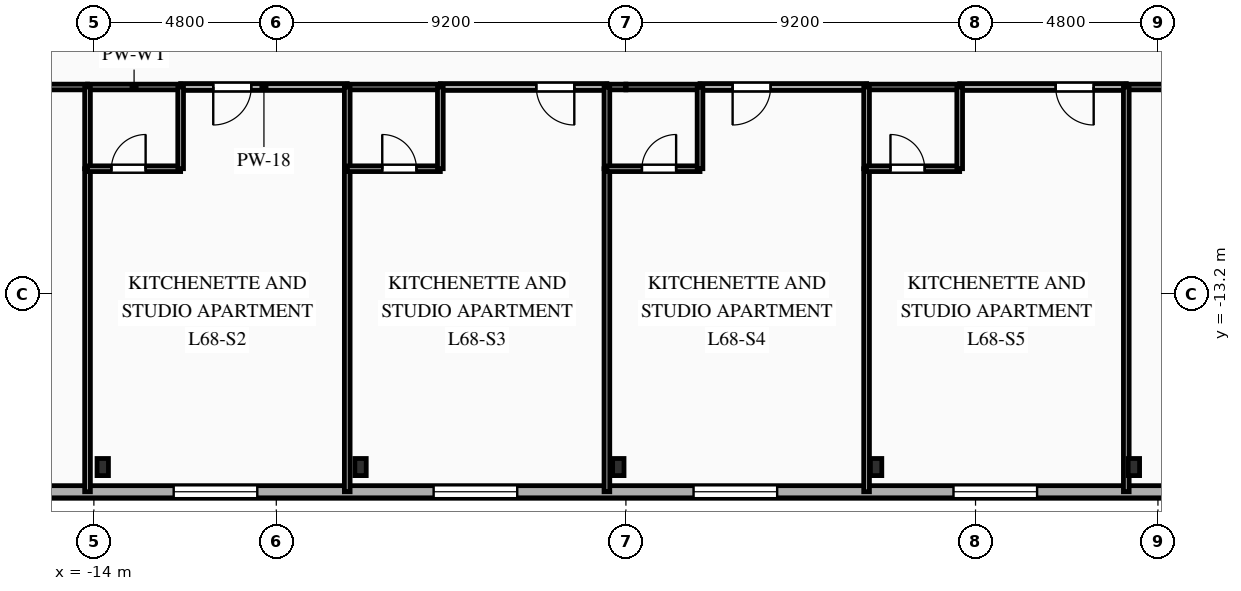
"""IFC4 building model, lengths in metres.
Left out: names, types, materials, properties, quantities, classifications, styles, units other than length and angle.
Written with IfcOpenShell. Run it as: python <this file> out.ifc"""

import sys

from ifc_helpers import new_model, si_unit, direction, frame, frame_2d, origin, origin_2d, place, context, subcontext, project, spatial, rectangle, i_section, extrude, element, fill, save


model = new_model("IFC4")
c1 = context("Model", 3, precision=1e-05, world=origin(), true_north=direction((0.0, 1.0)))
c2 = subcontext(c1, "Body", "Model", "MODEL_VIEW")
j1 = project(units=[si_unit("LENGTHUNIT", "METRE"), si_unit("PLANEANGLEUNIT", "RADIAN")], contexts=[c1])
p1 = place(None, origin())
s1 = spatial("IfcSite", under=j1, at=p1, CompositionType="ELEMENT")
p2 = place(p1, origin())
s2 = spatial("IfcBuilding", under=s1, at=p2, CompositionType="ELEMENT")
p3 = place(p2, frame((0.0, 0.0, 241.7)))
s3 = spatial("IfcBuildingStorey", under=s2, at=p3, CompositionType="ELEMENT", Elevation=241.7)
for number, where, z_axis, x_axis in (
    (1, (-13.767, -17.75, 0.0), (0.0, 0.0, 1.0), (1.0, 0.0, 0.0)),
    (2, (-6.983, -17.75, 0.0), (0.0, 0.0, 1.0), (1.0, 0.0, 0.0)),
    (3, (-0.2, -17.75, 0.0), (0.0, 0.0, 1.0), (1.0, 0.0, 0.0)),
    (4, (6.583, -17.75, 0.0), (0.0, 0.0, 1.0), (1.0, 0.0, 0.0)),
    (5, (13.367, -17.75, 0.0), (0.0, 0.0, 1.0), (1.0, 0.0, 0.0)),
):
    element("IfcColumn", number, at=place(p3, frame(where, z_axis=z_axis, x_axis=x_axis)), inside=s3, PredefinedType="COLUMN", context=c2, shape_type="SweptSolid", body=[
        extrude(i_section(OverallWidth=0.3, OverallDepth=0.45, WebThickness=0.014, FlangeThickness=0.026, FilletRadius=0.027, at=origin_2d()), origin(), (0.0, 0.0, 1.0), 3.35),
    ])
p4 = place(p3, frame((20.8, -18.4, 0.0), z_axis=(0.0, 0.0, 1.0), x_axis=(-1.0, 0.0, 0.0)))
e6 = element("IfcWall", 6, at=p4, inside=s3, PredefinedType="SOLIDWALL", context=c2, shape_type="SweptSolid", body=[
    extrude(rectangle(XDim=42.0, YDim=0.32, at=frame_2d((21.0, 0.0))), origin(), (0.0, 0.0, 1.0), 3.04),
])
p5 = place(p4, frame((3.255, 0.0, 0.85)))
e7 = element("IfcOpeningElement", 7, at=p5, cuts=e6, PredefinedType="OPENING", context=c2, shape_type="SweptSolid", body=[
    extrude(rectangle(XDim=1.65, YDim=1.85, at=frame_2d((0.825, 0.925))), frame((0.0, 0.17, 0.0), z_axis=(0.0, -1.0, 0.0), x_axis=(1.0, 0.0, 0.0)), (0.0, 0.0, 1.0), 0.34),
])
p6 = place(p4, frame((9.98, 0.0, 0.85)))
e8 = element("IfcOpeningElement", 8, at=p6, cuts=e6, PredefinedType="OPENING", context=c2, shape_type="SweptSolid", body=[
    extrude(rectangle(XDim=2.2, YDim=1.85, at=frame_2d((1.1, 0.925))), frame((0.0, 0.17, 0.0), z_axis=(0.0, -1.0, 0.0), x_axis=(1.0, 0.0, 0.0)), (0.0, 0.0, 1.0), 0.34),
])
p7 = place(p4, frame((16.82, 0.0, 0.85)))
e9 = element("IfcOpeningElement", 9, at=p7, cuts=e6, PredefinedType="OPENING", context=c2, shape_type="SweptSolid", body=[
    extrude(rectangle(XDim=2.2, YDim=1.85, at=frame_2d((1.1, 0.925))), frame((0.0, 0.17, 0.0), z_axis=(0.0, -1.0, 0.0), x_axis=(1.0, 0.0, 0.0)), (0.0, 0.0, 1.0), 0.34),
])
p8 = place(p4, frame((23.66, 0.0, 0.85)))
e10 = element("IfcOpeningElement", 10, at=p8, cuts=e6, PredefinedType="OPENING", context=c2, shape_type="SweptSolid", body=[
    extrude(rectangle(XDim=2.2, YDim=1.85, at=frame_2d((1.1, 0.925))), frame((0.0, 0.17, 0.0), z_axis=(0.0, -1.0, 0.0), x_axis=(1.0, 0.0, 0.0)), (0.0, 0.0, 1.0), 0.34),
])
p9 = place(p4, frame((30.5, 0.0, 0.85)))
e11 = element("IfcOpeningElement", 11, at=p9, cuts=e6, PredefinedType="OPENING", context=c2, shape_type="SweptSolid", body=[
    extrude(rectangle(XDim=2.2, YDim=1.85, at=frame_2d((1.1, 0.925))), frame((0.0, 0.17, 0.0), z_axis=(0.0, -1.0, 0.0), x_axis=(1.0, 0.0, 0.0)), (0.0, 0.0, 1.0), 0.34),
])
p10 = place(p4, frame((37.375, 0.0, 0.85)))
e12 = element("IfcOpeningElement", 12, at=p10, cuts=e6, PredefinedType="OPENING", context=c2, shape_type="SweptSolid", body=[
    extrude(rectangle(XDim=1.65, YDim=1.85, at=frame_2d((0.825, 0.925))), frame((0.0, 0.17, 0.0), z_axis=(0.0, -1.0, 0.0), x_axis=(1.0, 0.0, 0.0)), (0.0, 0.0, 1.0), 0.34),
])
p11 = place(p3, frame((-14.167, -7.75, 0.0), z_axis=(0.0, 0.0, 1.0), x_axis=(-1.0, 0.0, 0.0)))
e13 = element("IfcWall", 13, at=p11, inside=s3, PredefinedType="PARTITIONING", context=c2, shape_type="SweptSolid", body=[
    extrude(rectangle(XDim=6.333, YDim=0.15, at=frame_2d((3.167, 0.0))), origin(), (0.0, 0.0, 1.0), 3.04),
])
p12 = place(p11, frame((1.095, 0.0, 0.0)))
e14 = element("IfcOpeningElement", 14, at=p12, cuts=e13, PredefinedType="OPENING", context=c2, shape_type="SweptSolid", body=[
    extrude(rectangle(XDim=1.05, YDim=2.15, at=frame_2d((0.525, 1.075))), frame((0.0, 0.085, 0.0), z_axis=(0.0, -1.0, 0.0), x_axis=(1.0, 0.0, 0.0)), (0.0, 0.0, 1.0), 0.17),
])
p13 = place(p3, frame((-7.333, -7.75, 0.0), z_axis=(0.0, 0.0, 1.0), x_axis=(-1.0, 0.0, 0.0)))
e15 = element("IfcWall", 15, at=p13, inside=s3, PredefinedType="PARTITIONING", context=c2, shape_type="SweptSolid", body=[
    extrude(rectangle(XDim=4.384, YDim=0.18, at=frame_2d((2.192, 0.0))), origin(), (0.0, 0.0, 1.0), 3.04),
])
p14 = place(p13, frame((2.526, 0.0, 0.0)))
e16 = element("IfcOpeningElement", 16, at=p14, cuts=e15, PredefinedType="OPENING", context=c2, shape_type="SweptSolid", body=[
    extrude(rectangle(XDim=1.0, YDim=2.15, at=frame_2d((0.5, 1.075))), frame((0.0, 0.1, 0.0), z_axis=(0.0, -1.0, 0.0), x_axis=(1.0, 0.0, 0.0)), (0.0, 0.0, 1.0), 0.2),
])
p15 = place(p3, frame((-11.717, -7.75, 0.0), z_axis=(0.0, 0.0, 1.0), x_axis=(-1.0, 0.0, 0.0)))
e17 = element("IfcWall", 17, at=p15, inside=s3, PredefinedType="PLUMBINGWALL", context=c2, shape_type="SweptSolid", body=[
    extrude(rectangle(XDim=2.45, YDim=0.15, at=frame_2d((1.225, 0.0))), origin(), (0.0, 0.0, 1.0), 3.04),
])
p16 = place(p3, frame((-0.5, -7.75, 0.0), z_axis=(0.0, 0.0, 1.0), x_axis=(-1.0, 0.0, 0.0)))
e18 = element("IfcWall", 18, at=p16, inside=s3, PredefinedType="PARTITIONING", context=c2, shape_type="SweptSolid", body=[
    extrude(rectangle(XDim=4.383, YDim=0.18, at=frame_2d((2.191, 0.0))), origin(), (0.0, 0.0, 1.0), 3.04),
])
p17 = place(p16, frame((0.858, 0.0, 0.0)))
e19 = element("IfcOpeningElement", 19, at=p17, cuts=e18, PredefinedType="OPENING", context=c2, shape_type="SweptSolid", body=[
    extrude(rectangle(XDim=1.0, YDim=2.15, at=frame_2d((0.5, 1.075))), frame((0.0, 0.1, 0.0), z_axis=(0.0, -1.0, 0.0), x_axis=(1.0, 0.0, 0.0)), (0.0, 0.0, 1.0), 0.2),
])
p18 = place(p3, frame((-4.883, -7.75, 0.0), z_axis=(0.0, 0.0, 1.0), x_axis=(-1.0, 0.0, 0.0)))
e20 = element("IfcWall", 20, at=p18, inside=s3, PredefinedType="PLUMBINGWALL", context=c2, shape_type="SweptSolid", body=[
    extrude(rectangle(XDim=2.45, YDim=0.15, at=frame_2d((1.225, 0.0))), origin(), (0.0, 0.0, 1.0), 3.04),
])
p19 = place(p3, frame((0.0, -7.75, 0.0), z_axis=(0.0, 0.0, 1.0), x_axis=(-1.0, 0.0, 0.0)))
e21 = element("IfcWall", 21, at=p19, inside=s3, PredefinedType="PLUMBINGWALL", context=c2, shape_type="SweptSolid", body=[
    extrude(rectangle(XDim=0.5, YDim=0.15, at=frame_2d((0.25, 0.0))), origin(), (0.0, 0.0, 1.0), 3.04),
])
p20 = place(p3, frame((6.333, -7.75, 0.0), z_axis=(0.0, 0.0, 1.0), x_axis=(-1.0, 0.0, 0.0)))
e22 = element("IfcWall", 22, at=p20, inside=s3, PredefinedType="PARTITIONING", context=c2, shape_type="SweptSolid", body=[
    extrude(rectangle(XDim=4.383, YDim=0.18, at=frame_2d((2.191, 0.0))), origin(), (0.0, 0.0, 1.0), 3.04),
])
p21 = place(p20, frame((2.525, 0.0, 0.0)))
e23 = element("IfcOpeningElement", 23, at=p21, cuts=e22, PredefinedType="OPENING", context=c2, shape_type="SweptSolid", body=[
    extrude(rectangle(XDim=1.0, YDim=2.15, at=frame_2d((0.5, 1.075))), frame((0.0, 0.1, 0.0), z_axis=(0.0, -1.0, 0.0), x_axis=(1.0, 0.0, 0.0)), (0.0, 0.0, 1.0), 0.2),
])
p22 = place(p3, frame((1.95, -7.75, 0.0), z_axis=(0.0, 0.0, 1.0), x_axis=(-1.0, 0.0, 0.0)))
e24 = element("IfcWall", 24, at=p22, inside=s3, PredefinedType="PLUMBINGWALL", context=c2, shape_type="SweptSolid", body=[
    extrude(rectangle(XDim=1.95, YDim=0.15, at=frame_2d((0.975, 0.0))), origin(), (0.0, 0.0, 1.0), 3.04),
])
p23 = place(p3, frame((13.167, -7.75, 0.0), z_axis=(0.0, 0.0, 1.0), x_axis=(-1.0, 0.0, 0.0)))
e25 = element("IfcWall", 25, at=p23, inside=s3, PredefinedType="PARTITIONING", context=c2, shape_type="SweptSolid", body=[
    extrude(rectangle(XDim=4.384, YDim=0.18, at=frame_2d((2.192, 0.0))), origin(), (0.0, 0.0, 1.0), 3.04),
])
p24 = place(p23, frame((0.858, 0.0, 0.0)))
e26 = element("IfcOpeningElement", 26, at=p24, cuts=e25, PredefinedType="OPENING", context=c2, shape_type="SweptSolid", body=[
    extrude(rectangle(XDim=1.0, YDim=2.15, at=frame_2d((0.5, 1.075))), frame((0.0, 0.1, 0.0), z_axis=(0.0, -1.0, 0.0), x_axis=(1.0, 0.0, 0.0)), (0.0, 0.0, 1.0), 0.2),
])
p25 = place(p3, frame((8.783, -7.75, 0.0), z_axis=(0.0, 0.0, 1.0), x_axis=(-1.0, 0.0, 0.0)))
e27 = element("IfcWall", 27, at=p25, inside=s3, PredefinedType="PLUMBINGWALL", context=c2, shape_type="SweptSolid", body=[
    extrude(rectangle(XDim=2.45, YDim=0.15, at=frame_2d((1.225, 0.0))), origin(), (0.0, 0.0, 1.0), 3.04),
])
p26 = place(p3, frame((20.5, -7.75, 0.0), z_axis=(0.0, 0.0, 1.0), x_axis=(-1.0, 0.0, 0.0)))
e28 = element("IfcWall", 28, at=p26, inside=s3, PredefinedType="PARTITIONING", context=c2, shape_type="SweptSolid", body=[
    extrude(rectangle(XDim=7.333, YDim=0.15, at=frame_2d((3.667, 0.0))), origin(), (0.0, 0.0, 1.0), 3.04),
])
p27 = place(p26, frame((5.062, 0.0, 0.0)))
e29 = element("IfcOpeningElement", 29, at=p27, cuts=e28, PredefinedType="OPENING", context=c2, shape_type="SweptSolid", body=[
    extrude(rectangle(XDim=1.05, YDim=2.15, at=frame_2d((0.525, 1.075))), frame((0.0, 0.085, 0.0), z_axis=(0.0, -1.0, 0.0), x_axis=(1.0, 0.0, 0.0)), (0.0, 0.0, 1.0), 0.17),
])
p28 = place(p3, frame((-14.167, -9.9, 0.0), z_axis=(0.0, 0.0, 1.0), x_axis=(0.0, -1.0, 0.0)))
e30 = element("IfcWall", 30, at=p28, inside=s3, PredefinedType="PARTITIONING", context=c2, shape_type="SweptSolid", body=[
    extrude(rectangle(XDim=8.5, YDim=0.15, at=frame_2d((4.25, 0.0))), origin(), (0.0, 0.0, 1.0), 3.04),
])
p29 = place(p3, frame((-14.167, -7.75, 0.0), z_axis=(0.0, 0.0, 1.0), x_axis=(0.0, -1.0, 0.0)))
e31 = element("IfcWall", 31, at=p29, inside=s3, PredefinedType="PLUMBINGWALL", context=c2, shape_type="SweptSolid", body=[
    extrude(rectangle(XDim=2.15, YDim=0.15, at=frame_2d((1.075, 0.0))), origin(), (0.0, 0.0, 1.0), 3.04),
])
p30 = place(p3, frame((-14.167, -9.9, 0.0), z_axis=(0.0, 0.0, 1.0), x_axis=(1.0, 0.0, 0.0)))
e32 = element("IfcWall", 32, at=p30, inside=s3, PredefinedType="PLUMBINGWALL", context=c2, shape_type="SweptSolid", body=[
    extrude(rectangle(XDim=2.45, YDim=0.15, at=frame_2d((1.225, 0.0))), origin(), (0.0, 0.0, 1.0), 3.04),
])
p31 = place(p30, frame((0.629, 0.0, 0.0)))
e33 = element("IfcOpeningElement", 33, at=p31, cuts=e32, PredefinedType="OPENING", context=c2, shape_type="SweptSolid", body=[
    extrude(rectangle(XDim=0.9, YDim=2.1, at=frame_2d((0.45, 1.05))), frame((0.0, 0.085, 0.0), z_axis=(0.0, -1.0, 0.0), x_axis=(1.0, 0.0, 0.0)), (0.0, 0.0, 1.0), 0.17),
])
p32 = place(p3, frame((-11.717, -9.9, 0.0), z_axis=(0.0, 0.0, 1.0), x_axis=(0.0, 1.0, 0.0)))
e34 = element("IfcWall", 34, at=p32, inside=s3, PredefinedType="PLUMBINGWALL", context=c2, shape_type="SweptSolid", body=[
    extrude(rectangle(XDim=2.15, YDim=0.15, at=frame_2d((1.075, 0.0))), origin(), (0.0, 0.0, 1.0), 3.04),
])
p33 = place(p3, frame((-7.333, -9.9, 0.0), z_axis=(0.0, 0.0, 1.0), x_axis=(0.0, -1.0, 0.0)))
e35 = element("IfcWall", 35, at=p33, inside=s3, PredefinedType="PARTITIONING", context=c2, shape_type="SweptSolid", body=[
    extrude(rectangle(XDim=8.5, YDim=0.15, at=frame_2d((4.25, 0.0))), origin(), (0.0, 0.0, 1.0), 2.665),
])
p34 = place(p3, frame((-7.333, -7.75, 0.0), z_axis=(0.0, 0.0, 1.0), x_axis=(0.0, -1.0, 0.0)))
e36 = element("IfcWall", 36, at=p34, inside=s3, PredefinedType="PLUMBINGWALL", context=c2, shape_type="SweptSolid", body=[
    extrude(rectangle(XDim=2.15, YDim=0.15, at=frame_2d((1.075, 0.0))), origin(), (0.0, 0.0, 1.0), 3.04),
])
p35 = place(p3, frame((-7.333, -9.9, 0.0), z_axis=(0.0, 0.0, 1.0), x_axis=(1.0, 0.0, 0.0)))
e37 = element("IfcWall", 37, at=p35, inside=s3, PredefinedType="PLUMBINGWALL", context=c2, shape_type="SweptSolid", body=[
    extrude(rectangle(XDim=2.45, YDim=0.15, at=frame_2d((1.225, 0.0))), origin(), (0.0, 0.0, 1.0), 3.04),
])
p36 = place(p35, frame((0.921, 0.0, 0.0)))
e38 = element("IfcOpeningElement", 38, at=p36, cuts=e37, PredefinedType="OPENING", context=c2, shape_type="SweptSolid", body=[
    extrude(rectangle(XDim=0.9, YDim=2.1, at=frame_2d((0.45, 1.05))), frame((0.0, 0.085, 0.0), z_axis=(0.0, -1.0, 0.0), x_axis=(1.0, 0.0, 0.0)), (0.0, 0.0, 1.0), 0.17),
])
p37 = place(p3, frame((-4.883, -9.9, 0.0), z_axis=(0.0, 0.0, 1.0), x_axis=(0.0, 1.0, 0.0)))
e39 = element("IfcWall", 39, at=p37, inside=s3, PredefinedType="PLUMBINGWALL", context=c2, shape_type="SweptSolid", body=[
    extrude(rectangle(XDim=2.15, YDim=0.15, at=frame_2d((1.075, 0.0))), origin(), (0.0, 0.0, 1.0), 3.04),
])
p38 = place(p3, frame((-0.5, -9.9, 0.0), z_axis=(0.0, 0.0, 1.0), x_axis=(0.0, -1.0, 0.0)))
e40 = element("IfcWall", 40, at=p38, inside=s3, PredefinedType="PARTITIONING", context=c2, shape_type="SweptSolid", body=[
    extrude(rectangle(XDim=8.5, YDim=0.15, at=frame_2d((4.25, 0.0))), origin(), (0.0, 0.0, 1.0), 3.04),
])
p39 = place(p3, frame((-0.5, -7.75, 0.0), z_axis=(0.0, 0.0, 1.0), x_axis=(0.0, -1.0, 0.0)))
e41 = element("IfcWall", 41, at=p39, inside=s3, PredefinedType="PLUMBINGWALL", context=c2, shape_type="SweptSolid", body=[
    extrude(rectangle(XDim=2.15, YDim=0.15, at=frame_2d((1.075, 0.0))), origin(), (0.0, 0.0, 1.0), 3.04),
])
p40 = place(p3, frame((-0.5, -9.9, 0.0), z_axis=(0.0, 0.0, 1.0), x_axis=(1.0, 0.0, 0.0)))
e42 = element("IfcWall", 42, at=p40, inside=s3, PredefinedType="PLUMBINGWALL", context=c2, shape_type="SweptSolid", body=[
    extrude(rectangle(XDim=2.45, YDim=0.15, at=frame_2d((1.225, 0.0))), origin(), (0.0, 0.0, 1.0), 3.04),
])
p41 = place(p40, frame((0.921, 0.0, 0.0)))
e43 = element("IfcOpeningElement", 43, at=p41, cuts=e42, PredefinedType="OPENING", context=c2, shape_type="SweptSolid", body=[
    extrude(rectangle(XDim=0.9, YDim=2.1, at=frame_2d((0.45, 1.05))), frame((0.0, 0.085, 0.0), z_axis=(0.0, -1.0, 0.0), x_axis=(1.0, 0.0, 0.0)), (0.0, 0.0, 1.0), 0.17),
])
p42 = place(p3, frame((1.95, -9.9, 0.0), z_axis=(0.0, 0.0, 1.0), x_axis=(0.0, 1.0, 0.0)))
e44 = element("IfcWall", 44, at=p42, inside=s3, PredefinedType="PLUMBINGWALL", context=c2, shape_type="SweptSolid", body=[
    extrude(rectangle(XDim=2.15, YDim=0.15, at=frame_2d((1.075, 0.0))), origin(), (0.0, 0.0, 1.0), 3.04),
])
p43 = place(p3, frame((6.333, -9.9, 0.0), z_axis=(0.0, 0.0, 1.0), x_axis=(0.0, -1.0, 0.0)))
e45 = element("IfcWall", 45, at=p43, inside=s3, PredefinedType="PARTITIONING", context=c2, shape_type="SweptSolid", body=[
    extrude(rectangle(XDim=8.5, YDim=0.15, at=frame_2d((4.25, 0.0))), origin(), (0.0, 0.0, 1.0), 3.04),
])
p44 = place(p3, frame((6.333, -7.75, 0.0), z_axis=(0.0, 0.0, 1.0), x_axis=(0.0, -1.0, 0.0)))
e46 = element("IfcWall", 46, at=p44, inside=s3, PredefinedType="PLUMBINGWALL", context=c2, shape_type="SweptSolid", body=[
    extrude(rectangle(XDim=2.15, YDim=0.15, at=frame_2d((1.075, 0.0))), origin(), (0.0, 0.0, 1.0), 3.04),
])
p45 = place(p3, frame((6.333, -9.9, 0.0), z_axis=(0.0, 0.0, 1.0), x_axis=(1.0, 0.0, 0.0)))
e47 = element("IfcWall", 47, at=p45, inside=s3, PredefinedType="PLUMBINGWALL", context=c2, shape_type="SweptSolid", body=[
    extrude(rectangle(XDim=2.45, YDim=0.15, at=frame_2d((1.225, 0.0))), origin(), (0.0, 0.0, 1.0), 3.04),
])
p46 = place(p45, frame((0.629, 0.0, 0.0)))
e48 = element("IfcOpeningElement", 48, at=p46, cuts=e47, PredefinedType="OPENING", context=c2, shape_type="SweptSolid", body=[
    extrude(rectangle(XDim=0.9, YDim=2.1, at=frame_2d((0.45, 1.05))), frame((0.0, 0.085, 0.0), z_axis=(0.0, -1.0, 0.0), x_axis=(1.0, 0.0, 0.0)), (0.0, 0.0, 1.0), 0.17),
])
p47 = place(p3, frame((8.783, -9.9, 0.0), z_axis=(0.0, 0.0, 1.0), x_axis=(0.0, 1.0, 0.0)))
e49 = element("IfcWall", 49, at=p47, inside=s3, PredefinedType="PLUMBINGWALL", context=c2, shape_type="SweptSolid", body=[
    extrude(rectangle(XDim=2.15, YDim=0.15, at=frame_2d((1.075, 0.0))), origin(), (0.0, 0.0, 1.0), 2.665),
])
p48 = place(p3, frame((13.167, -7.75, 0.0), z_axis=(0.0, 0.0, 1.0), x_axis=(0.0, -1.0, 0.0)))
e50 = element("IfcWall", 50, at=p48, inside=s3, PredefinedType="PARTITIONING", context=c2, shape_type="SweptSolid", body=[
    extrude(rectangle(XDim=10.65, YDim=0.15, at=frame_2d((5.325, 0.0))), origin(), (0.0, 0.0, 1.0), 3.04),
])
p49 = place(p6, origin())
e51 = element("IfcWindow", 51, at=p49, inside=s3, PartitioningType="SINGLE_PANEL", PredefinedType="WINDOW", context=c2, shape_type="SweptSolid", body=[
    extrude(rectangle(XDim=2.2, YDim=1.85, at=frame_2d((1.1, 0.925))), frame((0.0, 0.03, 0.0), z_axis=(0.0, -1.0, 0.0), x_axis=(1.0, 0.0, 0.0)), (0.0, 0.0, 1.0), 0.06),
])
fill(e8, e51)
p50 = place(p7, origin())
e52 = element("IfcWindow", 52, at=p50, inside=s3, PartitioningType="SINGLE_PANEL", PredefinedType="WINDOW", context=c2, shape_type="SweptSolid", body=[
    extrude(rectangle(XDim=2.2, YDim=1.85, at=frame_2d((1.1, 0.925))), frame((0.0, 0.03, 0.0), z_axis=(0.0, -1.0, 0.0), x_axis=(1.0, 0.0, 0.0)), (0.0, 0.0, 1.0), 0.06),
])
fill(e9, e52)
p51 = place(p8, origin())
e53 = element("IfcWindow", 53, at=p51, inside=s3, PartitioningType="SINGLE_PANEL", PredefinedType="WINDOW", context=c2, shape_type="SweptSolid", body=[
    extrude(rectangle(XDim=2.2, YDim=1.85, at=frame_2d((1.1, 0.925))), frame((0.0, 0.03, 0.0), z_axis=(0.0, -1.0, 0.0), x_axis=(1.0, 0.0, 0.0)), (0.0, 0.0, 1.0), 0.06),
])
fill(e10, e53)
p52 = place(p9, origin())
e54 = element("IfcWindow", 54, at=p52, inside=s3, PartitioningType="SINGLE_PANEL", PredefinedType="WINDOW", context=c2, shape_type="SweptSolid", body=[
    extrude(rectangle(XDim=2.2, YDim=1.85, at=frame_2d((1.1, 0.925))), frame((0.0, 0.03, 0.0), z_axis=(0.0, -1.0, 0.0), x_axis=(1.0, 0.0, 0.0)), (0.0, 0.0, 1.0), 0.06),
])
fill(e11, e54)
p53 = place(p14, origin())
e55 = element("IfcDoor", 55, at=p53, inside=s3, OperationType="SINGLE_SWING_RIGHT", PredefinedType="DOOR", context=c2, shape_type="SweptSolid", body=[
    extrude(rectangle(XDim=1.0, YDim=2.15, at=frame_2d((0.5, 1.075))), frame((0.0, 0.025, 0.0), z_axis=(0.0, -1.0, 0.0), x_axis=(1.0, 0.0, 0.0)), (0.0, 0.0, 1.0), 0.05),
])
fill(e16, e55)
p54 = place(p17, origin())
e56 = element("IfcDoor", 56, at=p54, inside=s3, OperationType="SINGLE_SWING_LEFT", PredefinedType="DOOR", context=c2, shape_type="SweptSolid", body=[
    extrude(rectangle(XDim=1.0, YDim=2.15, at=frame_2d((0.5, 1.075))), frame((0.0, 0.025, 0.0), z_axis=(0.0, -1.0, 0.0), x_axis=(1.0, 0.0, 0.0)), (0.0, 0.0, 1.0), 0.05),
])
fill(e19, e56)
p55 = place(p21, origin())
e57 = element("IfcDoor", 57, at=p55, inside=s3, OperationType="SINGLE_SWING_RIGHT", PredefinedType="DOOR", context=c2, shape_type="SweptSolid", body=[
    extrude(rectangle(XDim=1.0, YDim=2.15, at=frame_2d((0.5, 1.075))), frame((0.0, 0.025, 0.0), z_axis=(0.0, -1.0, 0.0), x_axis=(1.0, 0.0, 0.0)), (0.0, 0.0, 1.0), 0.05),
])
fill(e23, e57)
p56 = place(p24, origin())
e58 = element("IfcDoor", 58, at=p56, inside=s3, OperationType="SINGLE_SWING_LEFT", PredefinedType="DOOR", context=c2, shape_type="SweptSolid", body=[
    extrude(rectangle(XDim=1.0, YDim=2.15, at=frame_2d((0.5, 1.075))), frame((0.0, 0.025, 0.0), z_axis=(0.0, -1.0, 0.0), x_axis=(1.0, 0.0, 0.0)), (0.0, 0.0, 1.0), 0.05),
])
fill(e26, e58)
p57 = place(p31, origin())
e59 = element("IfcDoor", 59, at=p57, inside=s3, OperationType="SINGLE_SWING_RIGHT", PredefinedType="DOOR", context=c2, shape_type="SweptSolid", body=[
    extrude(rectangle(XDim=0.9, YDim=2.1, at=frame_2d((0.45, 1.05))), frame((0.0, 0.025, 0.0), z_axis=(0.0, -1.0, 0.0), x_axis=(1.0, 0.0, 0.0)), (0.0, 0.0, 1.0), 0.05),
])
fill(e33, e59)
p58 = place(p36, origin())
e60 = element("IfcDoor", 60, at=p58, inside=s3, OperationType="SINGLE_SWING_LEFT", PredefinedType="DOOR", context=c2, shape_type="SweptSolid", body=[
    extrude(rectangle(XDim=0.9, YDim=2.1, at=frame_2d((0.45, 1.05))), frame((0.0, 0.025, 0.0), z_axis=(0.0, -1.0, 0.0), x_axis=(1.0, 0.0, 0.0)), (0.0, 0.0, 1.0), 0.05),
])
fill(e38, e60)
p59 = place(p41, origin())
e61 = element("IfcDoor", 61, at=p59, inside=s3, OperationType="SINGLE_SWING_RIGHT", PredefinedType="DOOR", context=c2, shape_type="SweptSolid", body=[
    extrude(rectangle(XDim=0.9, YDim=2.1, at=frame_2d((0.45, 1.05))), frame((0.0, 0.025, 0.0), z_axis=(0.0, -1.0, 0.0), x_axis=(1.0, 0.0, 0.0)), (0.0, 0.0, 1.0), 0.05),
])
fill(e43, e61)
p60 = place(p46, origin())
e62 = element("IfcDoor", 62, at=p60, inside=s3, OperationType="SINGLE_SWING_LEFT", PredefinedType="DOOR", context=c2, shape_type="SweptSolid", body=[
    extrude(rectangle(XDim=0.9, YDim=2.1, at=frame_2d((0.45, 1.05))), frame((0.0, 0.025, 0.0), z_axis=(0.0, -1.0, 0.0), x_axis=(1.0, 0.0, 0.0)), (0.0, 0.0, 1.0), 0.05),
])
fill(e48, e62)
save(model, sys.argv[1])
